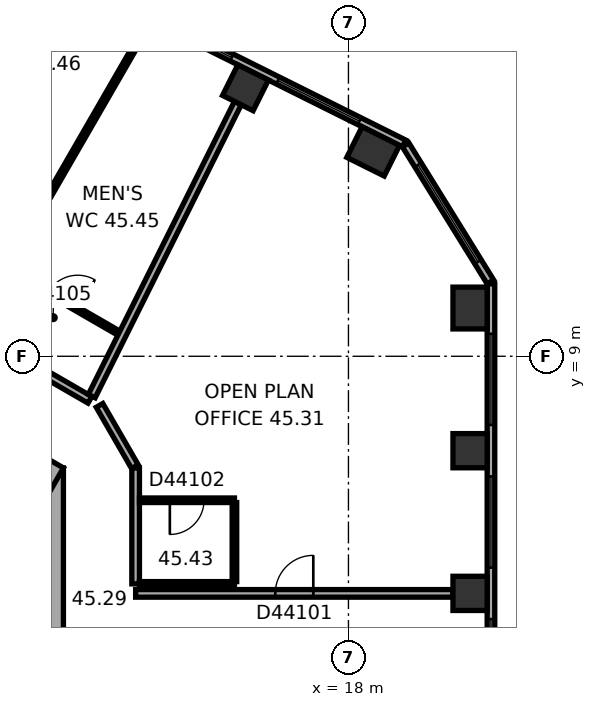
"""IFC4 building model, lengths in metres.
Left out: names, types, materials, properties, quantities, classifications, styles, units other than length and angle.
Written with IfcOpenShell. Run it as: python <this file> out.ifc"""

import sys

from ifc_helpers import new_model, si_unit, direction, frame, frame_2d, origin, origin_2d, place, context, subcontext, project, spatial, rectangle, extrude, element, fill, save


model = new_model("IFC4")
c1 = context("Model", 3, precision=1e-05, world=origin(), true_north=direction((0.0, 1.0)))
c2 = subcontext(c1, "Body", "Model", "MODEL_VIEW")
j1 = project(units=[si_unit("LENGTHUNIT", "METRE"), si_unit("PLANEANGLEUNIT", "RADIAN")], contexts=[c1])
p1 = place(None, origin())
s1 = spatial("IfcSite", under=j1, at=p1, CompositionType="ELEMENT")
p2 = place(p1, origin())
s2 = spatial("IfcBuilding", under=s1, at=p2, CompositionType="ELEMENT")
p3 = place(p2, frame((0.0, 0.0, 183.6)))
s3 = spatial("IfcBuildingStorey", under=s2, at=p3, CompositionType="ELEMENT", Elevation=183.6)
for number, where, z_axis, x_axis in (
    (1, (21.2, 2.761, 0.0), (0.0, 0.0, 1.0), (0.0, 1.0, 0.0)),
    (2, (21.2, 6.515, 0.0), (0.0, 0.0, 1.0), (0.0, 1.0, 0.0)),
):
    element("IfcColumn", number, at=place(p3, frame(where, z_axis=z_axis, x_axis=x_axis)), inside=s3, PredefinedType="COLUMN", context=c2, shape_type="SweptSolid", body=[
        extrude(rectangle(XDim=0.9, YDim=0.9, at=origin_2d()), origin(), (0.0, 0.0, 1.0), 3.7),
    ])
for number, where, z_axis, x_axis in (
    (3, (21.2, 10.27, 0.0), (0.0, 0.0, 1.0), (0.0, 1.0, 0.0)),
    (4, (18.65, 14.39, 0.0), (0.0, 0.0, 1.0), (-0.895, 0.446, 0.0)),
):
    element("IfcColumn", number, at=place(p3, frame(where, z_axis=z_axis, x_axis=x_axis)), inside=s3, PredefinedType="COLUMN", context=c2, shape_type="SweptSolid", body=[
        extrude(rectangle(XDim=1.1, YDim=0.9, at=origin_2d()), origin(), (0.0, 0.0, 1.0), 3.7),
    ])
p4 = place(p3, frame((15.29, 16.065, 0.0), z_axis=(0.0, 0.0, 1.0), x_axis=(-0.894934361602, 0.44619781311, 0.0)))
e5 = element("IfcColumn", 5, at=p4, inside=s3, PredefinedType="COLUMN", context=c2, shape_type="SweptSolid", body=[
    extrude(rectangle(XDim=0.9, YDim=0.9, at=origin_2d()), origin(), (0.0, 0.0, 1.0), 3.7),
])
p5 = place(p3, frame((10.0, -6.062, 0.0), z_axis=(0.0, 0.0, 1.0), x_axis=(0.0, 1.0, 0.0)))
e6 = element("IfcWall", 6, at=p5, inside=s3, PredefinedType="SHEAR", context=c2, shape_type="SweptSolid", body=[
    extrude(rectangle(XDim=12.125, YDim=1.0, at=frame_2d((6.062, 0.0))), origin(), (0.0, 0.0, 1.0), 3.7),
])
p6 = place(p5, frame((6.262, 0.0, 0.0)))
e7 = element("IfcOpeningElement", 7, at=p6, cuts=e6, PredefinedType="OPENING", context=c2, shape_type="SweptSolid", body=[
    extrude(rectangle(XDim=1.5, YDim=2.1, at=frame_2d((0.75, 1.05))), frame((0.0, 0.51, 0.0), z_axis=(0.0, -1.0, 0.0), x_axis=(1.0, 0.0, 0.0)), (0.0, 0.0, 1.0), 1.02),
])
p7 = place(p5, frame((3.112, 0.0, 0.0)))
e8 = element("IfcOpeningElement", 8, at=p7, cuts=e6, PredefinedType="OPENING", context=c2, shape_type="SweptSolid", body=[
    extrude(rectangle(XDim=0.9, YDim=2.1, at=frame_2d((0.45, 1.05))), frame((0.0, 0.51, 0.0), z_axis=(0.0, -1.0, 0.0), x_axis=(1.0, 0.0, 0.0)), (0.0, 0.0, 1.0), 1.02),
])
p8 = place(p3, frame((10.25, 5.629, 0.0), z_axis=(0.0, 0.0, 1.0), x_axis=(-0.866022616891, 0.50000482701, 0.0)))
e9 = element("IfcWall", 9, at=p8, inside=s3, PredefinedType="SHEAR", context=c2, shape_type="SweptSolid", body=[
    extrude(rectangle(XDim=12.125, YDim=1.0, at=frame_2d((6.062, 0.0))), origin(), (0.0, 0.0, 1.0), 3.7),
])
p9 = place(p8, frame((5.312, 0.0, 0.0)))
e10 = element("IfcOpeningElement", 10, at=p9, cuts=e9, PredefinedType="OPENING", context=c2, shape_type="SweptSolid", body=[
    extrude(rectangle(XDim=0.9, YDim=2.1, at=frame_2d((0.45, 1.05))), frame((0.0, 0.51, 0.0), z_axis=(0.0, -1.0, 0.0), x_axis=(1.0, 0.0, 0.0)), (0.0, 0.0, 1.0), 1.02),
])
p10 = place(p3, frame((21.75, -9.138, 0.0), z_axis=(0.0, 0.0, 1.0), x_axis=(0.0, 1.0, 0.0)))
e11 = element("IfcWall", 11, at=p10, inside=s3, PredefinedType="STANDARD", context=c2, shape_type="SweptSolid", body=[
    extrude(rectangle(XDim=20.044, YDim=0.2, at=frame_2d((10.022, 0.0))), origin(), (0.0, 0.0, 1.0), 3.7),
])
p11 = place(p10, frame((1.314, 0.0, 0.9)))
e12 = element("IfcOpeningElement", 12, at=p11, cuts=e11, PredefinedType="OPENING", context=c2, shape_type="SweptSolid", body=[
    extrude(rectangle(XDim=2.4, YDim=2.0, at=frame_2d((1.2, 1.0))), frame((0.0, 0.11, 0.0), z_axis=(0.0, -1.0, 0.0), x_axis=(1.0, 0.0, 0.0)), (0.0, 0.0, 1.0), 0.22),
])
p12 = place(p10, frame((5.069, 0.0, 0.9)))
e13 = element("IfcOpeningElement", 13, at=p12, cuts=e11, PredefinedType="OPENING", context=c2, shape_type="SweptSolid", body=[
    extrude(rectangle(XDim=2.4, YDim=2.0, at=frame_2d((1.2, 1.0))), frame((0.0, 0.11, 0.0), z_axis=(0.0, -1.0, 0.0), x_axis=(1.0, 0.0, 0.0)), (0.0, 0.0, 1.0), 0.22),
])
p13 = place(p10, frame((8.823, 0.0, 0.9)))
e14 = element("IfcOpeningElement", 14, at=p13, cuts=e11, PredefinedType="OPENING", context=c2, shape_type="SweptSolid", body=[
    extrude(rectangle(XDim=2.4, YDim=2.0, at=frame_2d((1.2, 1.0))), frame((0.0, 0.11, 0.0), z_axis=(0.0, -1.0, 0.0), x_axis=(1.0, 0.0, 0.0)), (0.0, 0.0, 1.0), 0.22),
])
p14 = place(p10, frame((12.577, 0.0, 0.9)))
e15 = element("IfcOpeningElement", 15, at=p14, cuts=e11, PredefinedType="OPENING", context=c2, shape_type="SweptSolid", body=[
    extrude(rectangle(XDim=2.4, YDim=2.0, at=frame_2d((1.2, 1.0))), frame((0.0, 0.11, 0.0), z_axis=(0.0, -1.0, 0.0), x_axis=(1.0, 0.0, 0.0)), (0.0, 0.0, 1.0), 0.22),
])
p15 = place(p10, frame((16.331, 0.0, 0.9)))
e16 = element("IfcOpeningElement", 16, at=p15, cuts=e11, PredefinedType="OPENING", context=c2, shape_type="SweptSolid", body=[
    extrude(rectangle(XDim=2.4, YDim=2.0, at=frame_2d((1.2, 1.0))), frame((0.0, 0.11, 0.0), z_axis=(0.0, -1.0, 0.0), x_axis=(1.0, 0.0, 0.0)), (0.0, 0.0, 1.0), 0.22),
])
p16 = place(p3, frame((21.735, 10.958, 0.0), z_axis=(0.0, 0.0, 1.0), x_axis=(-0.526213807775, 0.850352296702, 0.0)))
e17 = element("IfcWall", 17, at=p16, inside=s3, PredefinedType="STANDARD", context=c2, shape_type="SweptSolid", body=[
    extrude(rectangle(XDim=4.238, YDim=0.2, at=frame_2d((2.119, 0.0))), origin(), (0.0, 0.0, 1.0), 3.7),
])
p17 = place(p16, frame((0.619, 0.0, 0.9)))
e18 = element("IfcOpeningElement", 18, at=p17, cuts=e17, PredefinedType="OPENING", context=c2, shape_type="SweptSolid", body=[
    extrude(rectangle(XDim=3.0, YDim=2.0, at=frame_2d((1.5, 1.0))), frame((0.0, 0.11, 0.0), z_axis=(0.0, -1.0, 0.0), x_axis=(1.0, 0.0, 0.0)), (0.0, 0.0, 1.0), 0.22),
])
p18 = place(p3, frame((19.464, 14.599, 0.0), z_axis=(0.0, 0.0, 1.0), x_axis=(-0.894935755043, 0.446195018289, 0.0)))
e19 = element("IfcWall", 19, at=p18, inside=s3, PredefinedType="STANDARD", context=c2, shape_type="SweptSolid", body=[
    extrude(rectangle(XDim=20.044, YDim=0.2, at=frame_2d((10.022, 0.0))), origin(), (0.0, 0.0, 1.0), 3.7),
])
p19 = place(p18, frame((1.313, 0.0, 0.9)))
e20 = element("IfcOpeningElement", 20, at=p19, cuts=e19, PredefinedType="OPENING", context=c2, shape_type="SweptSolid", body=[
    extrude(rectangle(XDim=2.4, YDim=2.0, at=frame_2d((1.2, 1.0))), frame((0.0, 0.11, 0.0), z_axis=(0.0, -1.0, 0.0), x_axis=(1.0, 0.0, 0.0)), (0.0, 0.0, 1.0), 0.22),
])
p20 = place(p18, frame((5.067, 0.0, 0.9)))
e21 = element("IfcOpeningElement", 21, at=p20, cuts=e19, PredefinedType="OPENING", context=c2, shape_type="SweptSolid", body=[
    extrude(rectangle(XDim=2.4, YDim=2.0, at=frame_2d((1.2, 1.0))), frame((0.0, 0.11, 0.0), z_axis=(0.0, -1.0, 0.0), x_axis=(1.0, 0.0, 0.0)), (0.0, 0.0, 1.0), 0.22),
])
p21 = place(p18, frame((8.821, 0.0, 0.9)))
e22 = element("IfcOpeningElement", 22, at=p21, cuts=e19, PredefinedType="OPENING", context=c2, shape_type="SweptSolid", body=[
    extrude(rectangle(XDim=2.4, YDim=2.0, at=frame_2d((1.2, 1.0))), frame((0.0, 0.11, 0.0), z_axis=(0.0, -1.0, 0.0), x_axis=(1.0, 0.0, 0.0)), (0.0, 0.0, 1.0), 0.22),
])
p22 = place(p18, frame((12.575, 0.0, 0.9)))
e23 = element("IfcOpeningElement", 23, at=p22, cuts=e19, PredefinedType="OPENING", context=c2, shape_type="SweptSolid", body=[
    extrude(rectangle(XDim=2.4, YDim=2.0, at=frame_2d((1.2, 1.0))), frame((0.0, 0.11, 0.0), z_axis=(0.0, -1.0, 0.0), x_axis=(1.0, 0.0, 0.0)), (0.0, 0.0, 1.0), 0.22),
])
p23 = place(p18, frame((16.329, 0.0, 0.9)))
e24 = element("IfcOpeningElement", 24, at=p23, cuts=e19, PredefinedType="OPENING", context=c2, shape_type="SweptSolid", body=[
    extrude(rectangle(XDim=2.4, YDim=2.0, at=frame_2d((1.2, 1.0))), frame((0.0, 0.11, 0.0), z_axis=(0.0, -1.0, 0.0), x_axis=(1.0, 0.0, 0.0)), (0.0, 0.0, 1.0), 0.22),
])
p24 = place(p3, frame((11.196, 7.854, 0.0), z_axis=(0.0, 0.0, 1.0), x_axis=(-0.866023877043, 0.500002644385, 0.0)))
e25 = element("IfcWall", 25, at=p24, inside=s3, PredefinedType="PARTITIONING", context=c2, shape_type="SweptSolid", body=[
    extrude(rectangle(XDim=11.792, YDim=0.2, at=frame_2d((5.896, 0.0))), origin(), (0.0, 0.0, 1.0), 3.42),
])
p25 = place(p24, frame((3.261, 0.0, 0.0)))
e26 = element("IfcOpeningElement", 26, at=p25, cuts=e25, PredefinedType="OPENING", context=c2, shape_type="SweptSolid", body=[
    extrude(rectangle(XDim=1.0, YDim=2.1, at=frame_2d((0.5, 1.05))), frame((0.0, 0.11, 0.0), z_axis=(0.0, -1.0, 0.0), x_axis=(1.0, 0.0, 0.0)), (0.0, 0.0, 1.0), 0.22),
])
p26 = place(p3, frame((11.959, 9.608, 0.0), z_axis=(0.0, 0.0, 1.0), x_axis=(-0.866018452427, 0.500012039911, 0.0)))
e27 = element("IfcWall", 27, at=p26, inside=s3, PredefinedType="PARTITIONING", context=c2, shape_type="SweptSolid", body=[
    extrude(rectangle(XDim=7.322, YDim=0.12, at=frame_2d((3.661, 0.0))), origin(), (0.0, 0.0, 1.0), 3.42),
])
p27 = place(p26, frame((5.858, 0.0, 0.0)))
e28 = element("IfcOpeningElement", 28, at=p27, cuts=e27, PredefinedType="OPENING", context=c2, shape_type="SweptSolid", body=[
    extrude(rectangle(XDim=1.0, YDim=2.1, at=frame_2d((0.5, 1.05))), frame((0.0, 0.07, 0.0), z_axis=(0.0, -1.0, 0.0), x_axis=(1.0, 0.0, 0.0)), (0.0, 0.0, 1.0), 0.14),
])
p28 = place(p26, frame((1.25, 0.0, 0.0)))
e29 = element("IfcOpeningElement", 29, at=p28, cuts=e27, PredefinedType="OPENING", context=c2, shape_type="SweptSolid", body=[
    extrude(rectangle(XDim=0.9, YDim=2.1, at=frame_2d((0.45, 1.05))), frame((0.0, 0.07, 0.0), z_axis=(0.0, -1.0, 0.0), x_axis=(1.0, 0.0, 0.0)), (0.0, 0.0, 1.0), 0.14),
])
p29 = place(p26, frame((3.947, 0.0, 0.0)))
e30 = element("IfcOpeningElement", 30, at=p29, cuts=e27, PredefinedType="OPENING", context=c2, shape_type="SweptSolid", body=[
    extrude(rectangle(XDim=0.9, YDim=2.1, at=frame_2d((0.45, 1.05))), frame((0.0, 0.07, 0.0), z_axis=(0.0, -1.0, 0.0), x_axis=(1.0, 0.0, 0.0)), (0.0, 0.0, 1.0), 0.14),
])
p30 = place(p3, frame((12.325, 17.041, 0.0), z_axis=(0.0, 0.0, 1.0), x_axis=(-0.499985538654, -0.866033752885, 0.0)))
e31 = element("IfcWall", 31, at=p30, inside=s3, PredefinedType="PARTITIONING", context=c2, shape_type="SweptSolid", body=[
    extrude(rectangle(XDim=6.56, YDim=0.12, at=frame_2d((3.28, 0.0))), origin(), (0.0, 0.0, 1.0), 3.42),
])
p31 = place(p3, frame((12.38, 6.097, 0.0), z_axis=(0.0, 0.0, 1.0), x_axis=(-0.499964847546, 0.866045698112, 0.0)))
e32 = element("IfcWall", 32, at=p31, inside=s3, PredefinedType="PARTITIONING", context=c2, shape_type="SweptSolid", body=[
    extrude(rectangle(XDim=1.86, YDim=0.2, at=frame_2d((0.93, 0.0))), origin(), (0.0, 0.0, 1.0), 3.42),
])
p32 = place(p3, frame((12.4, 3.011, 0.0), z_axis=(0.0, 0.0, 1.0), x_axis=(0.0, 1.0, 0.0)))
e33 = element("IfcWall", 33, at=p32, inside=s3, PredefinedType="PARTITIONING", context=c2, shape_type="SweptSolid", body=[
    extrude(rectangle(XDim=3.051, YDim=0.2, at=frame_2d((1.525, 0.0))), origin(), (0.0, 0.0, 1.0), 3.42),
])
p33 = place(p3, frame((12.5, 5.211, 0.0), z_axis=(0.0, 0.0, 1.0), x_axis=(1.0, 0.0, 0.0)))
e34 = element("IfcWall", 34, at=p33, inside=s3, PredefinedType="PARTITIONING", context=c2, shape_type="SweptSolid", body=[
    extrude(rectangle(XDim=2.5, YDim=0.12, at=frame_2d((1.25, 0.0))), origin(), (0.0, 0.0, 1.0), 3.42),
])
p34 = place(p33, frame((0.8, 0.0, 0.0)))
e35 = element("IfcOpeningElement", 35, at=p34, cuts=e34, PredefinedType="OPENING", context=c2, shape_type="SweptSolid", body=[
    extrude(rectangle(XDim=0.9, YDim=2.1, at=frame_2d((0.45, 1.05))), frame((0.0, 0.07, 0.0), z_axis=(0.0, -1.0, 0.0), x_axis=(1.0, 0.0, 0.0)), (0.0, 0.0, 1.0), 0.14),
])
p35 = place(p3, frame((15.0, 3.011, 0.0), z_axis=(0.0, 0.0, 1.0), x_axis=(-1.0, 0.0, 0.0)))
e36 = element("IfcWall", 36, at=p35, inside=s3, PredefinedType="PARTITIONING", context=c2, shape_type="SweptSolid", body=[
    extrude(rectangle(XDim=2.5, YDim=0.12, at=frame_2d((1.25, 0.0))), origin(), (0.0, 0.0, 1.0), 3.42),
])
p36 = place(p3, frame((15.0, 5.151, 0.0), z_axis=(0.0, 0.0, 1.0), x_axis=(0.0, -1.0, 0.0)))
e37 = element("IfcWall", 37, at=p36, inside=s3, PredefinedType="PARTITIONING", context=c2, shape_type="SweptSolid", body=[
    extrude(rectangle(XDim=2.08, YDim=0.12, at=frame_2d((1.04, 0.0))), origin(), (0.0, 0.0, 1.0), 3.42),
])
p37 = place(p3, frame((15.09, 15.663, 0.0), z_axis=(0.0, 0.0, 1.0), x_axis=(-0.446204491029, -0.894931032083, 0.0)))
e38 = element("IfcWall", 38, at=p37, inside=s3, PredefinedType="PARTITIONING", context=c2, shape_type="SweptSolid", body=[
    extrude(rectangle(XDim=8.615, YDim=0.2, at=frame_2d((4.308, 0.0))), origin(), (0.0, 0.0, 1.0), 3.42),
])
p38 = place(p3, frame((20.75, 2.761, 0.0), z_axis=(0.0, 0.0, 1.0), x_axis=(-1.0, 0.0, 0.0)))
e39 = element("IfcWall", 39, at=p38, inside=s3, PredefinedType="PARTITIONING", context=c2, shape_type="SweptSolid", body=[
    extrude(rectangle(XDim=8.35, YDim=0.2, at=frame_2d((4.175, 0.0))), origin(), (0.0, 0.0, 1.0), 3.42),
])
p39 = place(p38, frame((3.675, 0.0, 0.0)))
e40 = element("IfcOpeningElement", 40, at=p39, cuts=e39, PredefinedType="OPENING", context=c2, shape_type="SweptSolid", body=[
    extrude(rectangle(XDim=1.0, YDim=2.1, at=frame_2d((0.5, 1.05))), frame((0.0, 0.11, 0.0), z_axis=(0.0, -1.0, 0.0), x_axis=(1.0, 0.0, 0.0)), (0.0, 0.0, 1.0), 0.22),
])
p40 = place(p13, origin())
e41 = element("IfcWindow", 41, at=p40, inside=s3, PartitioningType="SINGLE_PANEL", PredefinedType="WINDOW", context=c2, shape_type="SweptSolid", body=[
    extrude(rectangle(XDim=2.4, YDim=2.0, at=frame_2d((1.2, 1.0))), frame((0.0, 0.03, 0.0), z_axis=(0.0, -1.0, 0.0), x_axis=(1.0, 0.0, 0.0)), (0.0, 0.0, 1.0), 0.06),
])
fill(e14, e41)
p41 = place(p14, origin())
e42 = element("IfcWindow", 42, at=p41, inside=s3, PartitioningType="SINGLE_PANEL", PredefinedType="WINDOW", context=c2, shape_type="SweptSolid", body=[
    extrude(rectangle(XDim=2.4, YDim=2.0, at=frame_2d((1.2, 1.0))), frame((0.0, 0.03, 0.0), z_axis=(0.0, -1.0, 0.0), x_axis=(1.0, 0.0, 0.0)), (0.0, 0.0, 1.0), 0.06),
])
fill(e15, e42)
p42 = place(p15, origin())
e43 = element("IfcWindow", 43, at=p42, inside=s3, PartitioningType="SINGLE_PANEL", PredefinedType="WINDOW", context=c2, shape_type="SweptSolid", body=[
    extrude(rectangle(XDim=2.4, YDim=2.0, at=frame_2d((1.2, 1.0))), frame((0.0, 0.03, 0.0), z_axis=(0.0, -1.0, 0.0), x_axis=(1.0, 0.0, 0.0)), (0.0, 0.0, 1.0), 0.06),
])
fill(e16, e43)
p43 = place(p17, origin())
e44 = element("IfcWindow", 44, at=p43, inside=s3, PartitioningType="SINGLE_PANEL", PredefinedType="WINDOW", context=c2, shape_type="SweptSolid", body=[
    extrude(rectangle(XDim=3.0, YDim=2.0, at=frame_2d((1.5, 1.0))), frame((0.0, 0.03, 0.0), z_axis=(0.0, -1.0, 0.0), x_axis=(1.0, 0.0, 0.0)), (0.0, 0.0, 1.0), 0.06),
])
fill(e18, e44)
p44 = place(p19, origin())
e45 = element("IfcWindow", 45, at=p44, inside=s3, PartitioningType="SINGLE_PANEL", PredefinedType="WINDOW", context=c2, shape_type="SweptSolid", body=[
    extrude(rectangle(XDim=2.4, YDim=2.0, at=frame_2d((1.2, 1.0))), frame((0.0, 0.03, 0.0), z_axis=(0.0, -1.0, 0.0), x_axis=(1.0, 0.0, 0.0)), (0.0, 0.0, 1.0), 0.06),
])
fill(e20, e45)
p45 = place(p20, origin())
e46 = element("IfcWindow", 46, at=p45, inside=s3, PartitioningType="SINGLE_PANEL", PredefinedType="WINDOW", context=c2, shape_type="SweptSolid", body=[
    extrude(rectangle(XDim=2.4, YDim=2.0, at=frame_2d((1.2, 1.0))), frame((0.0, 0.03, 0.0), z_axis=(0.0, -1.0, 0.0), x_axis=(1.0, 0.0, 0.0)), (0.0, 0.0, 1.0), 0.06),
])
fill(e21, e46)
p46 = place(p39, origin())
e47 = element("IfcDoor", 47, at=p46, inside=s3, OperationType="SINGLE_SWING_LEFT", PredefinedType="DOOR", context=c2, shape_type="SweptSolid", body=[
    extrude(rectangle(XDim=1.0, YDim=2.1, at=frame_2d((0.5, 1.05))), frame((0.0, 0.025, 0.0), z_axis=(0.0, -1.0, 0.0), x_axis=(1.0, 0.0, 0.0)), (0.0, 0.0, 1.0), 0.05),
])
fill(e40, e47)
p47 = place(p34, origin())
e48 = element("IfcDoor", 48, at=p47, inside=s3, OperationType="SINGLE_SWING_LEFT", PredefinedType="DOOR", context=c2, shape_type="SweptSolid", body=[
    extrude(rectangle(XDim=0.9, YDim=2.1, at=frame_2d((0.45, 1.05))), frame((0.0, 0.025, 0.0), z_axis=(0.0, -1.0, 0.0), x_axis=(1.0, 0.0, 0.0)), (0.0, 0.0, 1.0), 0.05),
])
fill(e35, e48)
p48 = place(p28, origin())
e49 = element("IfcDoor", 49, at=p48, inside=s3, OperationType="SINGLE_SWING_LEFT", PredefinedType="DOOR", context=c2, shape_type="SweptSolid", body=[
    extrude(rectangle(XDim=0.9, YDim=2.1, at=frame_2d((0.45, 1.05))), frame((0.0, 0.025, 0.0), z_axis=(0.0, -1.0, 0.0), x_axis=(1.0, 0.0, 0.0)), (0.0, 0.0, 1.0), 0.05),
])
fill(e29, e49)
save(model, sys.argv[1])
